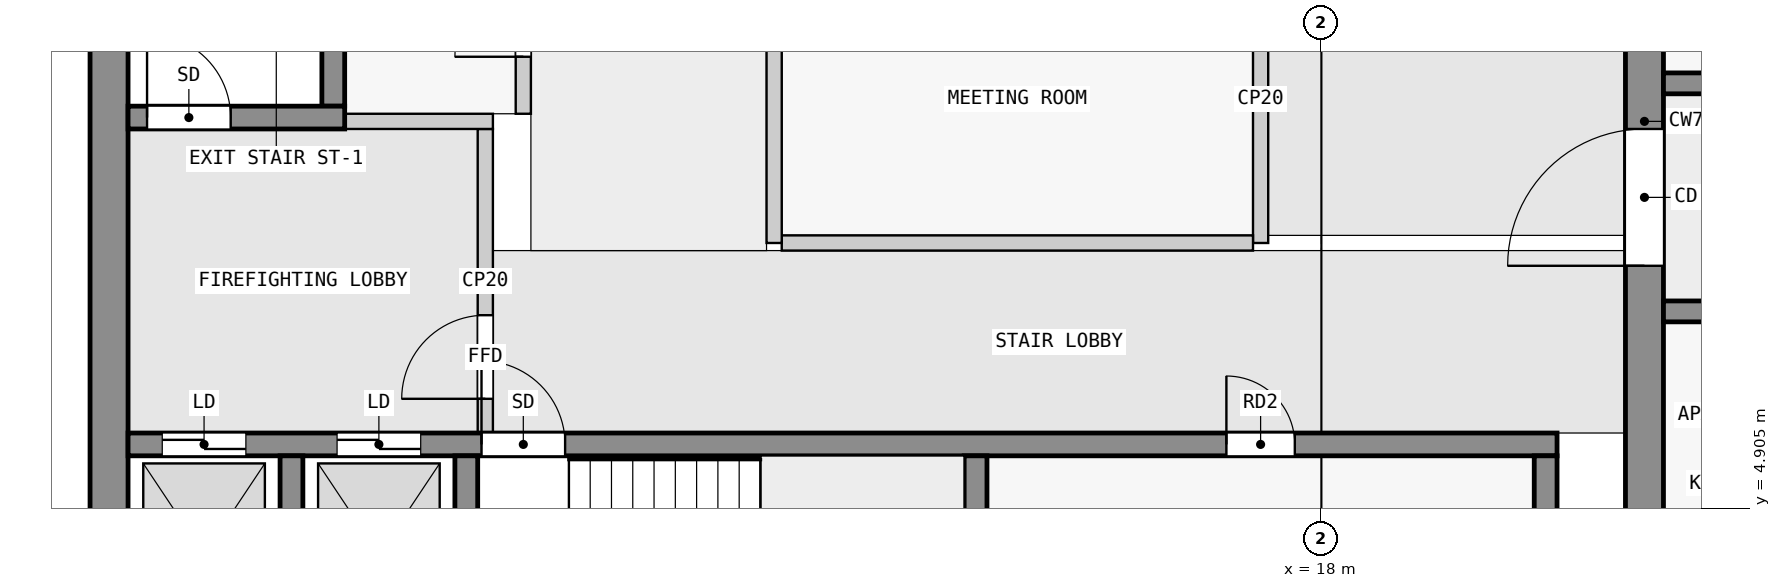
"""IFC4 building model, lengths in metres.
Left out: names, types, materials, properties, quantities, classifications, styles, units other than length and angle.
Written with IfcOpenShell. Run it as: python <this file> out.ifc"""

import sys

from ifc_helpers import new_model, si_unit, direction, frame, frame_2d, origin, place, context, subcontext, project, spatial, rectangle, extrude, element, fill, save


model = new_model("IFC4")
c1 = context("Model", 3, precision=1e-05, world=origin(), true_north=direction((0.0, 1.0)))
c2 = subcontext(c1, "Body", "Model", "MODEL_VIEW")
j1 = project(units=[si_unit("LENGTHUNIT", "METRE"), si_unit("PLANEANGLEUNIT", "RADIAN")], contexts=[c1])
p1 = place(None, origin())
s1 = spatial("IfcSite", under=j1, at=p1, CompositionType="ELEMENT")
p2 = place(p1, origin())
s2 = spatial("IfcBuilding", under=s1, at=p2, CompositionType="ELEMENT")
p3 = place(p2, frame((0.0, 0.0, 215.4)))
s3 = spatial("IfcBuildingStorey", under=s2, at=p3, CompositionType="ELEMENT", Elevation=215.4)
p4 = place(p3, frame((2.05, 2.5, 0.0), z_axis=(0.0, 0.0, 1.0), x_axis=(0.0, 1.0, 0.0)))
e1 = element("IfcWall", 1, at=p4, inside=s3, PredefinedType="SHEAR", context=c2, shape_type="SweptSolid", body=[
    extrude(rectangle(XDim=15.0, YDim=0.5, at=frame_2d((7.5, 0.0))), origin(), (0.0, 0.0, 1.0), 3.25),
])
p5 = place(p3, frame((22.25, 2.5, 0.0), z_axis=(0.0, 0.0, 1.0), x_axis=(0.0, 1.0, 0.0)))
e2 = element("IfcWall", 2, at=p5, inside=s3, PredefinedType="SHEAR", context=c2, shape_type="SweptSolid", body=[
    extrude(rectangle(XDim=15.0, YDim=0.5, at=frame_2d((7.5, 0.0))), origin(), (0.0, 0.0, 1.0), 3.25),
])
p6 = place(p5, frame((5.6, 0.0, 0.0)))
e3 = element("IfcOpeningElement", 3, at=p6, cuts=e2, PredefinedType="OPENING", context=c2, shape_type="SweptSolid", body=[
    extrude(rectangle(XDim=1.8, YDim=2.1, at=frame_2d((0.9, 1.05))), frame((0.0, 0.26, 0.0), z_axis=(0.0, -1.0, 0.0), x_axis=(1.0, 0.0, 0.0)), (0.0, 0.0, 1.0), 0.52),
])
for number, where, z_axis, x_axis in (
    (4, (4.45, 2.8, 0.0), (0.0, 0.0, 1.0), (0.0, 1.0, 0.0)),
    (5, (6.75, 2.8, 0.0), (0.0, 0.0, 1.0), (0.0, 1.0, 0.0)),
    (6, (13.45, 2.8, 0.0), (0.0, 0.0, 1.0), (0.0, 1.0, 0.0)),
    (7, (20.95, 2.8, 0.0), (0.0, 0.0, 1.0), (0.0, 1.0, 0.0)),
):
    element("IfcWall", number, at=place(p3, frame(where, z_axis=z_axis, x_axis=x_axis)), inside=s3, PredefinedType="SHEAR", context=c2, shape_type="SweptSolid", body=[
        extrude(rectangle(XDim=2.8, YDim=0.3, at=frame_2d((1.4, 0.0))), origin(), (0.0, 0.0, 1.0), 3.25),
    ])
p7 = place(p3, frame((2.3, 5.75, 0.0), z_axis=(0.0, 0.0, 1.0), x_axis=(1.0, 0.0, 0.0)))
e8 = element("IfcWall", 8, at=p7, inside=s3, PredefinedType="SHEAR", context=c2, shape_type="SweptSolid", body=[
    extrude(rectangle(XDim=18.8, YDim=0.3, at=frame_2d((9.4, 0.0))), origin(), (0.0, 0.0, 1.0), 3.25),
])
p8 = place(p7, frame((4.65, 0.0, 0.0)))
e9 = element("IfcOpeningElement", 9, at=p8, cuts=e8, PredefinedType="OPENING", context=c2, shape_type="SweptSolid", body=[
    extrude(rectangle(XDim=1.1, YDim=2.1, at=frame_2d((0.55, 1.05))), frame((0.0, 0.16, 0.0), z_axis=(0.0, -1.0, 0.0), x_axis=(1.0, 0.0, 0.0)), (0.0, 0.0, 1.0), 0.32),
])
p9 = place(p7, frame((0.45, 0.0, 0.0)))
e10 = element("IfcOpeningElement", 10, at=p9, cuts=e8, PredefinedType="OPENING", context=c2, shape_type="SweptSolid", body=[
    extrude(rectangle(XDim=1.1, YDim=2.1, at=frame_2d((0.55, 1.05))), frame((0.0, 0.16, 0.0), z_axis=(0.0, -1.0, 0.0), x_axis=(1.0, 0.0, 0.0)), (0.0, 0.0, 1.0), 0.32),
])
p10 = place(p7, frame((2.75, 0.0, 0.0)))
e11 = element("IfcOpeningElement", 11, at=p10, cuts=e8, PredefinedType="OPENING", context=c2, shape_type="SweptSolid", body=[
    extrude(rectangle(XDim=1.1, YDim=2.1, at=frame_2d((0.55, 1.05))), frame((0.0, 0.16, 0.0), z_axis=(0.0, -1.0, 0.0), x_axis=(1.0, 0.0, 0.0)), (0.0, 0.0, 1.0), 0.32),
])
p11 = place(p7, frame((14.45, 0.0, 0.0)))
e12 = element("IfcOpeningElement", 12, at=p11, cuts=e8, PredefinedType="OPENING", context=c2, shape_type="SweptSolid", body=[
    extrude(rectangle(XDim=0.9, YDim=2.1, at=frame_2d((0.45, 1.05))), frame((0.0, 0.16, 0.0), z_axis=(0.0, -1.0, 0.0), x_axis=(1.0, 0.0, 0.0)), (0.0, 0.0, 1.0), 0.32),
])
p12 = place(p3, frame((2.3, 10.05, 0.0), z_axis=(0.0, 0.0, 1.0), x_axis=(1.0, 0.0, 0.0)))
e13 = element("IfcWall", 13, at=p12, inside=s3, PredefinedType="SHEAR", context=c2, shape_type="SweptSolid", body=[
    extrude(rectangle(XDim=2.85, YDim=0.3, at=frame_2d((1.425, 0.0))), origin(), (0.0, 0.0, 1.0), 3.25),
])
p13 = place(p12, frame((0.25, 0.0, 0.0)))
e14 = element("IfcOpeningElement", 14, at=p13, cuts=e13, PredefinedType="OPENING", context=c2, shape_type="SweptSolid", body=[
    extrude(rectangle(XDim=1.1, YDim=2.1, at=frame_2d((0.55, 1.05))), frame((0.0, 0.16, 0.0), z_axis=(0.0, -1.0, 0.0), x_axis=(1.0, 0.0, 0.0)), (0.0, 0.0, 1.0), 0.32),
])
p14 = place(p3, frame((5.0, 10.2, 0.0), z_axis=(0.0, 0.0, 1.0), x_axis=(0.0, 1.0, 0.0)))
e15 = element("IfcWall", 15, at=p14, inside=s3, PredefinedType="SHEAR", context=c2, shape_type="SweptSolid", body=[
    extrude(rectangle(XDim=6.4, YDim=0.3, at=frame_2d((3.2, 0.0))), origin(), (0.0, 0.0, 1.0), 3.25),
])
p15 = place(p3, frame((22.5, 7.5, 0.0), z_axis=(0.0, 0.0, 1.0), x_axis=(1.0, 0.0, 0.0)))
e16 = element("IfcWall", 16, at=p15, inside=s3, PredefinedType="SHEAR", context=c2, shape_type="SweptSolid", body=[
    extrude(rectangle(XDim=22.5, YDim=0.275, at=frame_2d((11.25, 0.0))), origin(), (0.0, 0.0, 1.0), 3.25),
])
p16 = place(p15, frame((4.05, 0.0, 0.0)))
e17 = element("IfcOpeningElement", 17, at=p16, cuts=e16, PredefinedType="OPENING", context=c2, shape_type="SweptSolid", body=[
    extrude(rectangle(XDim=1.0, YDim=2.1, at=frame_2d((0.5, 1.05))), frame((0.0, 0.147, 0.0), z_axis=(0.0, -1.0, 0.0), x_axis=(1.0, 0.0, 0.0)), (0.0, 0.0, 1.0), 0.295),
])
p17 = place(p15, frame((10.75, 0.0, 0.0)))
e18 = element("IfcOpeningElement", 18, at=p17, cuts=e16, PredefinedType="OPENING", context=c2, shape_type="SweptSolid", body=[
    extrude(rectangle(XDim=1.0, YDim=2.1, at=frame_2d((0.5, 1.05))), frame((0.0, 0.147, 0.0), z_axis=(0.0, -1.0, 0.0), x_axis=(1.0, 0.0, 0.0)), (0.0, 0.0, 1.0), 0.295),
])
p18 = place(p15, frame((15.25, 0.0, 0.0)))
e19 = element("IfcOpeningElement", 19, at=p18, cuts=e16, PredefinedType="OPENING", context=c2, shape_type="SweptSolid", body=[
    extrude(rectangle(XDim=1.0, YDim=2.1, at=frame_2d((0.5, 1.05))), frame((0.0, 0.147, 0.0), z_axis=(0.0, -1.0, 0.0), x_axis=(1.0, 0.0, 0.0)), (0.0, 0.0, 1.0), 0.295),
])
p19 = place(p15, frame((18.75, 0.0, 0.0)))
e20 = element("IfcOpeningElement", 20, at=p19, cuts=e16, PredefinedType="OPENING", context=c2, shape_type="SweptSolid", body=[
    extrude(rectangle(XDim=0.9, YDim=2.1, at=frame_2d((0.45, 1.05))), frame((0.0, 0.147, 0.0), z_axis=(0.0, -1.0, 0.0), x_axis=(1.0, 0.0, 0.0)), (0.0, 0.0, 1.0), 0.295),
])
p20 = place(p15, frame((20.95, 0.0, 0.0)))
e21 = element("IfcOpeningElement", 21, at=p20, cuts=e16, PredefinedType="OPENING", context=c2, shape_type="SweptSolid", body=[
    extrude(rectangle(XDim=1.0, YDim=2.1, at=frame_2d((0.5, 1.05))), frame((0.0, 0.147, 0.0), z_axis=(0.0, -1.0, 0.0), x_axis=(1.0, 0.0, 0.0)), (0.0, 0.0, 1.0), 0.295),
])
p21 = place(p3, frame((22.5, 10.5, 0.0), z_axis=(0.0, 0.0, 1.0), x_axis=(1.0, 0.0, 0.0)))
e22 = element("IfcWall", 22, at=p21, inside=s3, PredefinedType="SHEAR", context=c2, shape_type="SweptSolid", body=[
    extrude(rectangle(XDim=22.5, YDim=0.275, at=frame_2d((11.25, 0.0))), origin(), (0.0, 0.0, 1.0), 3.25),
])
p22 = place(p21, frame((1.75, 0.0, 0.0)))
e23 = element("IfcOpeningElement", 23, at=p22, cuts=e22, PredefinedType="OPENING", context=c2, shape_type="SweptSolid", body=[
    extrude(rectangle(XDim=1.0, YDim=2.1, at=frame_2d((0.5, 1.05))), frame((0.0, 0.147, 0.0), z_axis=(0.0, -1.0, 0.0), x_axis=(1.0, 0.0, 0.0)), (0.0, 0.0, 1.0), 0.295),
])
p23 = place(p21, frame((5.85, 0.0, 0.0)))
e24 = element("IfcOpeningElement", 24, at=p23, cuts=e22, PredefinedType="OPENING", context=c2, shape_type="SweptSolid", body=[
    extrude(rectangle(XDim=1.8, YDim=2.1, at=frame_2d((0.9, 1.05))), frame((0.0, 0.147, 0.0), z_axis=(0.0, -1.0, 0.0), x_axis=(1.0, 0.0, 0.0)), (0.0, 0.0, 1.0), 0.295),
])
p24 = place(p21, frame((10.75, 0.0, 0.0)))
e25 = element("IfcOpeningElement", 25, at=p24, cuts=e22, PredefinedType="OPENING", context=c2, shape_type="SweptSolid", body=[
    extrude(rectangle(XDim=1.0, YDim=2.1, at=frame_2d((0.5, 1.05))), frame((0.0, 0.147, 0.0), z_axis=(0.0, -1.0, 0.0), x_axis=(1.0, 0.0, 0.0)), (0.0, 0.0, 1.0), 0.295),
])
p25 = place(p21, frame((16.85, 0.0, 0.0)))
e26 = element("IfcOpeningElement", 26, at=p25, cuts=e22, PredefinedType="OPENING", context=c2, shape_type="SweptSolid", body=[
    extrude(rectangle(XDim=1.0, YDim=2.1, at=frame_2d((0.5, 1.05))), frame((0.0, 0.147, 0.0), z_axis=(0.0, -1.0, 0.0), x_axis=(1.0, 0.0, 0.0)), (0.0, 0.0, 1.0), 0.295),
])
p26 = place(p3, frame((7.0, 5.9, 0.0), z_axis=(0.0, 0.0, 1.0), x_axis=(0.0, 1.0, 0.0)))
e27 = element("IfcWall", 27, at=p26, inside=s3, PredefinedType="PARTITIONING", context=c2, shape_type="SweptSolid", body=[
    extrude(rectangle(XDim=4.0, YDim=0.2, at=frame_2d((2.0, 0.0))), origin(), (0.0, 0.0, 1.0), 3.25),
])
p27 = place(p26, frame((0.45, 0.0, 0.0)))
e28 = element("IfcOpeningElement", 28, at=p27, cuts=e27, PredefinedType="OPENING", context=c2, shape_type="SweptSolid", body=[
    extrude(rectangle(XDim=1.1, YDim=2.1, at=frame_2d((0.55, 1.05))), frame((0.0, 0.11, 0.0), z_axis=(0.0, -1.0, 0.0), x_axis=(1.0, 0.0, 0.0)), (0.0, 0.0, 1.0), 0.22),
])
p28 = place(p3, frame((5.15, 10.0, 0.0), z_axis=(0.0, 0.0, 1.0), x_axis=(1.0, 0.0, 0.0)))
e29 = element("IfcWall", 29, at=p28, inside=s3, PredefinedType="PARTITIONING", context=c2, shape_type="SweptSolid", body=[
    extrude(rectangle(XDim=1.95, YDim=0.2, at=frame_2d((0.975, 0.0))), origin(), (0.0, 0.0, 1.0), 3.25),
])
p29 = place(p3, frame((10.8, 8.4, 0.0), z_axis=(0.0, 0.0, 1.0), x_axis=(0.0, 1.0, 0.0)))
e30 = element("IfcWall", 30, at=p29, inside=s3, PredefinedType="PARTITIONING", context=c2, shape_type="SweptSolid", body=[
    extrude(rectangle(XDim=3.8, YDim=0.2, at=frame_2d((1.9, 0.0))), origin(), (0.0, 0.0, 1.0), 3.25),
])
p30 = place(p3, frame((10.9, 8.4, 0.0), z_axis=(0.0, 0.0, 1.0), x_axis=(1.0, 0.0, 0.0)))
e31 = element("IfcWall", 31, at=p30, inside=s3, PredefinedType="PARTITIONING", context=c2, shape_type="SweptSolid", body=[
    extrude(rectangle(XDim=6.2, YDim=0.2, at=frame_2d((3.1, 0.0))), origin(), (0.0, 0.0, 1.0), 3.25),
])
p31 = place(p3, frame((17.2, 8.4, 0.0), z_axis=(0.0, 0.0, 1.0), x_axis=(0.0, 1.0, 0.0)))
e32 = element("IfcWall", 32, at=p31, inside=s3, PredefinedType="PARTITIONING", context=c2, shape_type="SweptSolid", body=[
    extrude(rectangle(XDim=3.8, YDim=0.2, at=frame_2d((1.9, 0.0))), origin(), (0.0, 0.0, 1.0), 3.25),
])
p32 = place(p3, frame((7.5, 10.1, 0.0), z_axis=(0.0, 0.0, 1.0), x_axis=(0.0, 1.0, 0.0)))
e33 = element("IfcWall", 33, at=p32, inside=s3, PredefinedType="PARTITIONING", context=c2, shape_type="SweptSolid", body=[
    extrude(rectangle(XDim=7.4, YDim=0.2, at=frame_2d((3.7, 0.0))), origin(), (0.0, 0.0, 1.0), 3.25),
])
p33 = place(p32, frame((0.75, 0.0, 0.0)))
e34 = element("IfcOpeningElement", 34, at=p33, cuts=e33, PredefinedType="OPENING", context=c2, shape_type="SweptSolid", body=[
    extrude(rectangle(XDim=0.9, YDim=2.1, at=frame_2d((0.45, 1.05))), frame((0.0, 0.11, 0.0), z_axis=(0.0, -1.0, 0.0), x_axis=(1.0, 0.0, 0.0)), (0.0, 0.0, 1.0), 0.22),
])
p34 = place(p32, frame((3.175, 0.0, 0.0)))
e35 = element("IfcOpeningElement", 35, at=p34, cuts=e33, PredefinedType="OPENING", context=c2, shape_type="SweptSolid", body=[
    extrude(rectangle(XDim=0.9, YDim=2.1, at=frame_2d((0.45, 1.05))), frame((0.0, 0.11, 0.0), z_axis=(0.0, -1.0, 0.0), x_axis=(1.0, 0.0, 0.0)), (0.0, 0.0, 1.0), 0.22),
])
p35 = place(p32, frame((5.25, 0.0, 0.0)))
e36 = element("IfcOpeningElement", 36, at=p35, cuts=e33, PredefinedType="OPENING", context=c2, shape_type="SweptSolid", body=[
    extrude(rectangle(XDim=0.9, YDim=2.1, at=frame_2d((0.45, 1.05))), frame((0.0, 0.11, 0.0), z_axis=(0.0, -1.0, 0.0), x_axis=(1.0, 0.0, 0.0)), (0.0, 0.0, 1.0), 0.22),
])
p36 = place(p27, origin())
e37 = element("IfcDoor", 37, at=p36, inside=s3, OperationType="SINGLE_SWING_LEFT", PredefinedType="DOOR", context=c2, shape_type="SweptSolid", body=[
    extrude(rectangle(XDim=1.1, YDim=2.1, at=frame_2d((0.55, 1.05))), frame((0.0, 0.025, 0.0), z_axis=(0.0, -1.0, 0.0), x_axis=(1.0, 0.0, 0.0)), (0.0, 0.0, 1.0), 0.05),
])
fill(e28, e37)
p37 = place(p13, origin())
e38 = element("IfcDoor", 38, at=p37, inside=s3, OperationType="SINGLE_SWING_RIGHT", PredefinedType="DOOR", context=c2, shape_type="SweptSolid", body=[
    extrude(rectangle(XDim=1.1, YDim=2.1, at=frame_2d((0.55, 1.05))), frame((0.0, 0.025, 0.0), z_axis=(0.0, -1.0, 0.0), x_axis=(1.0, 0.0, 0.0)), (0.0, 0.0, 1.0), 0.05),
])
fill(e14, e38)
p38 = place(p8, origin())
e39 = element("IfcDoor", 39, at=p38, inside=s3, OperationType="SINGLE_SWING_LEFT", PredefinedType="DOOR", context=c2, shape_type="SweptSolid", body=[
    extrude(rectangle(XDim=1.1, YDim=2.1, at=frame_2d((0.55, 1.05))), frame((0.0, 0.025, 0.0), z_axis=(0.0, -1.0, 0.0), x_axis=(1.0, 0.0, 0.0)), (0.0, 0.0, 1.0), 0.05),
])
fill(e9, e39)
p39 = place(p9, origin())
e40 = element("IfcDoor", 40, at=p39, inside=s3, OperationType="DOUBLE_DOOR_SLIDING", PredefinedType="DOOR", context=c2, shape_type="SweptSolid", body=[
    extrude(rectangle(XDim=1.1, YDim=2.1, at=frame_2d((0.55, 1.05))), frame((0.0, 0.025, 0.0), z_axis=(0.0, -1.0, 0.0), x_axis=(1.0, 0.0, 0.0)), (0.0, 0.0, 1.0), 0.05),
])
fill(e10, e40)
p40 = place(p10, origin())
e41 = element("IfcDoor", 41, at=p40, inside=s3, OperationType="DOUBLE_DOOR_SLIDING", PredefinedType="DOOR", context=c2, shape_type="SweptSolid", body=[
    extrude(rectangle(XDim=1.1, YDim=2.1, at=frame_2d((0.55, 1.05))), frame((0.0, 0.025, 0.0), z_axis=(0.0, -1.0, 0.0), x_axis=(1.0, 0.0, 0.0)), (0.0, 0.0, 1.0), 0.05),
])
fill(e11, e41)
p41 = place(p6, origin())
e42 = element("IfcDoor", 42, at=p41, inside=s3, OperationType="DOUBLE_DOOR_SINGLE_SWING", PredefinedType="DOOR", context=c2, shape_type="SweptSolid", body=[
    extrude(rectangle(XDim=1.8, YDim=2.1, at=frame_2d((0.9, 1.05))), frame((0.0, 0.025, 0.0), z_axis=(0.0, -1.0, 0.0), x_axis=(1.0, 0.0, 0.0)), (0.0, 0.0, 1.0), 0.05),
])
fill(e3, e42)
p42 = place(p33, origin())
e43 = element("IfcDoor", 43, at=p42, inside=s3, OperationType="SINGLE_SWING_RIGHT", PredefinedType="DOOR", context=c2, shape_type="SweptSolid", body=[
    extrude(rectangle(XDim=0.9, YDim=2.1, at=frame_2d((0.45, 1.05))), frame((0.0, 0.025, 0.0), z_axis=(0.0, -1.0, 0.0), x_axis=(1.0, 0.0, 0.0)), (0.0, 0.0, 1.0), 0.05),
])
fill(e34, e43)
p43 = place(p11, origin())
e44 = element("IfcDoor", 44, at=p43, inside=s3, OperationType="SINGLE_SWING_LEFT", PredefinedType="DOOR", context=c2, shape_type="SweptSolid", body=[
    extrude(rectangle(XDim=0.9, YDim=2.1, at=frame_2d((0.45, 1.05))), frame((0.0, 0.025, 0.0), z_axis=(0.0, -1.0, 0.0), x_axis=(1.0, 0.0, 0.0)), (0.0, 0.0, 1.0), 0.05),
])
fill(e12, e44)
save(model, sys.argv[1])
